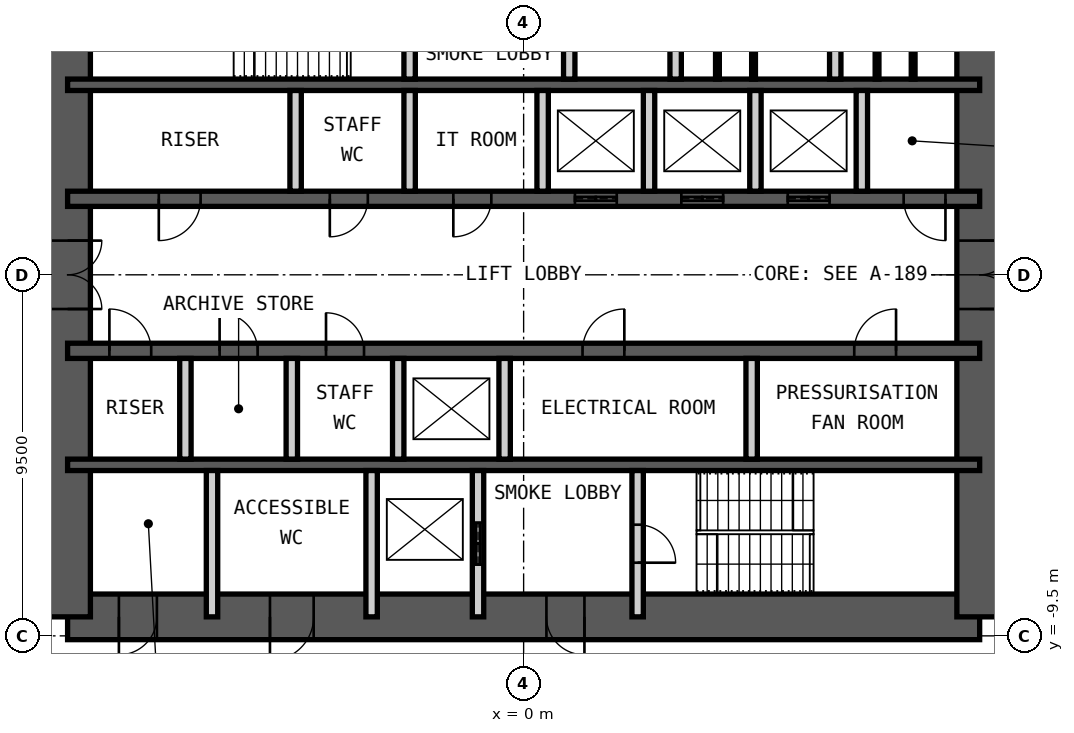
"""IFC4 building model, lengths in metres.
Left out: names, types, materials, properties, quantities, classifications, styles, units other than length and angle.
Written with IfcOpenShell. Run it as: python <this file> out.ifc"""

import sys

from ifc_helpers import new_model, si_unit, direction, frame, frame_2d, origin, place, context, subcontext, project, spatial, rectangle, extrude, element, fill, save


model = new_model("IFC4")
c1 = context("Model", 3, precision=1e-05, world=origin(), true_north=direction((0.0, 1.0)))
c2 = subcontext(c1, "Body", "Model", "MODEL_VIEW")
j1 = project(units=[si_unit("LENGTHUNIT", "METRE"), si_unit("PLANEANGLEUNIT", "RADIAN")], contexts=[c1])
p1 = place(None, origin())
s1 = spatial("IfcSite", under=j1, at=p1, CompositionType="ELEMENT")
p2 = place(p1, origin())
s2 = spatial("IfcBuilding", under=s1, at=p2, CompositionType="ELEMENT")
p3 = place(p2, frame((0.0, 0.0, 247.6)))
s3 = spatial("IfcBuildingStorey", under=s2, at=p3, CompositionType="ELEMENT", Elevation=247.6)
p4 = place(p3, frame((-12.0, -9.0, 0.0), z_axis=(0.0, 0.0, 1.0), x_axis=(1.0, 0.0, 0.0)))
e1 = element("IfcWall", 1, at=p4, inside=s3, PredefinedType="SHEAR", context=c2, shape_type="SweptSolid", body=[
    extrude(rectangle(XDim=24.0, YDim=1.2, at=frame_2d((12.0, 0.0))), origin(), (0.0, 0.0, 1.0), 4.2),
])
p5 = place(p4, frame((1.35, 0.0, 0.0)))
e2 = element("IfcOpeningElement", 2, at=p5, cuts=e1, PredefinedType="OPENING", context=c2, shape_type="SweptSolid", body=[
    extrude(rectangle(XDim=1.0, YDim=2.1, at=frame_2d((0.5, 1.05))), frame((0.0, 0.61, 0.0), z_axis=(0.0, -1.0, 0.0), x_axis=(1.0, 0.0, 0.0)), (0.0, 0.0, 1.0), 1.22),
])
p6 = place(p4, frame((5.325, 0.0, 0.0)))
e3 = element("IfcOpeningElement", 3, at=p6, cuts=e1, PredefinedType="OPENING", context=c2, shape_type="SweptSolid", body=[
    extrude(rectangle(XDim=1.15, YDim=2.1, at=frame_2d((0.575, 1.05))), frame((0.0, 0.61, 0.0), z_axis=(0.0, -1.0, 0.0), x_axis=(1.0, 0.0, 0.0)), (0.0, 0.0, 1.0), 1.22),
])
p7 = place(p4, frame((12.6, 0.0, 0.0)))
e4 = element("IfcOpeningElement", 4, at=p7, cuts=e1, PredefinedType="OPENING", context=c2, shape_type="SweptSolid", body=[
    extrude(rectangle(XDim=1.0, YDim=2.1, at=frame_2d((0.5, 1.05))), frame((0.0, 0.61, 0.0), z_axis=(0.0, -1.0, 0.0), x_axis=(1.0, 0.0, 0.0)), (0.0, 0.0, 1.0), 1.22),
])
p8 = place(p3, frame((12.0, -9.0, 0.0), z_axis=(0.0, 0.0, 1.0), x_axis=(0.0, 1.0, 0.0)))
e5 = element("IfcWall", 5, at=p8, inside=s3, PredefinedType="SHEAR", context=c2, shape_type="SweptSolid", body=[
    extrude(rectangle(XDim=18.0, YDim=1.2, at=frame_2d((9.0, 0.0))), origin(), (0.0, 0.0, 1.0), 4.2),
])
p9 = place(p8, frame((8.1, 0.0, 0.0)))
e6 = element("IfcOpeningElement", 6, at=p9, cuts=e5, PredefinedType="OPENING", context=c2, shape_type="SweptSolid", body=[
    extrude(rectangle(XDim=1.8, YDim=2.1, at=frame_2d((0.9, 1.05))), frame((0.0, 0.61, 0.0), z_axis=(0.0, -1.0, 0.0), x_axis=(1.0, 0.0, 0.0)), (0.0, 0.0, 1.0), 1.22),
])
p10 = place(p3, frame((-12.0, -9.0, 0.0), z_axis=(0.0, 0.0, 1.0), x_axis=(0.0, 1.0, 0.0)))
e7 = element("IfcWall", 7, at=p10, inside=s3, PredefinedType="SHEAR", context=c2, shape_type="SweptSolid", body=[
    extrude(rectangle(XDim=18.0, YDim=1.2, at=frame_2d((9.0, 0.0))), origin(), (0.0, 0.0, 1.0), 4.2),
])
p11 = place(p10, frame((8.1, 0.0, 0.0)))
e8 = element("IfcOpeningElement", 8, at=p11, cuts=e7, PredefinedType="OPENING", context=c2, shape_type="SweptSolid", body=[
    extrude(rectangle(XDim=1.8, YDim=2.1, at=frame_2d((0.9, 1.05))), frame((0.0, 0.61, 0.0), z_axis=(0.0, -1.0, 0.0), x_axis=(1.0, 0.0, 0.0)), (0.0, 0.0, 1.0), 1.22),
])
p12 = place(p3, frame((-12.0, 5.0, 0.0), z_axis=(0.0, 0.0, 1.0), x_axis=(1.0, 0.0, 0.0)))
e9 = element("IfcWall", 9, at=p12, inside=s3, PredefinedType="SHEAR", context=c2, shape_type="SweptSolid", body=[
    extrude(rectangle(XDim=24.0, YDim=0.3, at=frame_2d((12.0, 0.0))), origin(), (0.0, 0.0, 1.0), 4.2),
])
p13 = place(p3, frame((-12.0, 2.0, 0.0), z_axis=(0.0, 0.0, 1.0), x_axis=(1.0, 0.0, 0.0)))
e10 = element("IfcWall", 10, at=p13, inside=s3, PredefinedType="SHEAR", context=c2, shape_type="SweptSolid", body=[
    extrude(rectangle(XDim=24.0, YDim=0.4, at=frame_2d((12.0, 0.0))), origin(), (0.0, 0.0, 1.0), 4.2),
])
p14 = place(p13, frame((2.4, 0.0, 0.0)))
e11 = element("IfcOpeningElement", 11, at=p14, cuts=e10, PredefinedType="OPENING", context=c2, shape_type="SweptSolid", body=[
    extrude(rectangle(XDim=1.1, YDim=2.1, at=frame_2d((0.55, 1.05))), frame((0.0, 0.21, 0.0), z_axis=(0.0, -1.0, 0.0), x_axis=(1.0, 0.0, 0.0)), (0.0, 0.0, 1.0), 0.42),
])
p15 = place(p13, frame((22.0, 0.0, 0.0)))
e12 = element("IfcOpeningElement", 12, at=p15, cuts=e10, PredefinedType="OPENING", context=c2, shape_type="SweptSolid", body=[
    extrude(rectangle(XDim=1.1, YDim=2.1, at=frame_2d((0.55, 1.05))), frame((0.0, 0.21, 0.0), z_axis=(0.0, -1.0, 0.0), x_axis=(1.0, 0.0, 0.0)), (0.0, 0.0, 1.0), 0.42),
])
p16 = place(p13, frame((10.15, 0.0, 0.0)))
e13 = element("IfcOpeningElement", 13, at=p16, cuts=e10, PredefinedType="OPENING", context=c2, shape_type="SweptSolid", body=[
    extrude(rectangle(XDim=1.0, YDim=2.1, at=frame_2d((0.5, 1.05))), frame((0.0, 0.21, 0.0), z_axis=(0.0, -1.0, 0.0), x_axis=(1.0, 0.0, 0.0)), (0.0, 0.0, 1.0), 0.42),
])
p17 = place(p13, frame((6.9, 0.0, 0.0)))
e14 = element("IfcOpeningElement", 14, at=p17, cuts=e10, PredefinedType="OPENING", context=c2, shape_type="SweptSolid", body=[
    extrude(rectangle(XDim=1.0, YDim=2.1, at=frame_2d((0.5, 1.05))), frame((0.0, 0.21, 0.0), z_axis=(0.0, -1.0, 0.0), x_axis=(1.0, 0.0, 0.0)), (0.0, 0.0, 1.0), 0.42),
])
p18 = place(p13, frame((13.35, 0.0, 0.0)))
e15 = element("IfcOpeningElement", 15, at=p18, cuts=e10, PredefinedType="OPENING", context=c2, shape_type="SweptSolid", body=[
    extrude(rectangle(XDim=1.1, YDim=2.4, at=frame_2d((0.55, 1.2))), frame((0.0, 0.21, 0.0), z_axis=(0.0, -1.0, 0.0), x_axis=(1.0, 0.0, 0.0)), (0.0, 0.0, 1.0), 0.42),
])
p19 = place(p13, frame((16.15, 0.0, 0.0)))
e16 = element("IfcOpeningElement", 16, at=p19, cuts=e10, PredefinedType="OPENING", context=c2, shape_type="SweptSolid", body=[
    extrude(rectangle(XDim=1.1, YDim=2.4, at=frame_2d((0.55, 1.2))), frame((0.0, 0.21, 0.0), z_axis=(0.0, -1.0, 0.0), x_axis=(1.0, 0.0, 0.0)), (0.0, 0.0, 1.0), 0.42),
])
p20 = place(p13, frame((18.95, 0.0, 0.0)))
e17 = element("IfcOpeningElement", 17, at=p20, cuts=e10, PredefinedType="OPENING", context=c2, shape_type="SweptSolid", body=[
    extrude(rectangle(XDim=1.1, YDim=2.4, at=frame_2d((0.55, 1.2))), frame((0.0, 0.21, 0.0), z_axis=(0.0, -1.0, 0.0), x_axis=(1.0, 0.0, 0.0)), (0.0, 0.0, 1.0), 0.42),
])
p21 = place(p3, frame((-12.0, -2.0, 0.0), z_axis=(0.0, 0.0, 1.0), x_axis=(1.0, 0.0, 0.0)))
e18 = element("IfcWall", 18, at=p21, inside=s3, PredefinedType="SHEAR", context=c2, shape_type="SweptSolid", body=[
    extrude(rectangle(XDim=24.0, YDim=0.4, at=frame_2d((12.0, 0.0))), origin(), (0.0, 0.0, 1.0), 4.2),
])
p22 = place(p21, frame((1.1, 0.0, 0.0)))
e19 = element("IfcOpeningElement", 19, at=p22, cuts=e18, PredefinedType="OPENING", context=c2, shape_type="SweptSolid", body=[
    extrude(rectangle(XDim=1.1, YDim=2.1, at=frame_2d((0.55, 1.05))), frame((0.0, 0.21, 0.0), z_axis=(0.0, -1.0, 0.0), x_axis=(1.0, 0.0, 0.0)), (0.0, 0.0, 1.0), 0.42),
])
p23 = place(p21, frame((13.55, 0.0, 0.0)))
e20 = element("IfcOpeningElement", 20, at=p23, cuts=e18, PredefinedType="OPENING", context=c2, shape_type="SweptSolid", body=[
    extrude(rectangle(XDim=1.1, YDim=2.1, at=frame_2d((0.55, 1.05))), frame((0.0, 0.21, 0.0), z_axis=(0.0, -1.0, 0.0), x_axis=(1.0, 0.0, 0.0)), (0.0, 0.0, 1.0), 0.42),
])
p24 = place(p21, frame((20.7, 0.0, 0.0)))
e21 = element("IfcOpeningElement", 21, at=p24, cuts=e18, PredefinedType="OPENING", context=c2, shape_type="SweptSolid", body=[
    extrude(rectangle(XDim=1.1, YDim=2.1, at=frame_2d((0.55, 1.05))), frame((0.0, 0.21, 0.0), z_axis=(0.0, -1.0, 0.0), x_axis=(1.0, 0.0, 0.0)), (0.0, 0.0, 1.0), 0.42),
])
p25 = place(p21, frame((4.0, 0.0, 0.0)))
e22 = element("IfcOpeningElement", 22, at=p25, cuts=e18, PredefinedType="OPENING", context=c2, shape_type="SweptSolid", body=[
    extrude(rectangle(XDim=1.0, YDim=2.1, at=frame_2d((0.5, 1.05))), frame((0.0, 0.21, 0.0), z_axis=(0.0, -1.0, 0.0), x_axis=(1.0, 0.0, 0.0)), (0.0, 0.0, 1.0), 0.42),
])
p26 = place(p21, frame((6.8, 0.0, 0.0)))
e23 = element("IfcOpeningElement", 23, at=p26, cuts=e18, PredefinedType="OPENING", context=c2, shape_type="SweptSolid", body=[
    extrude(rectangle(XDim=1.0, YDim=2.1, at=frame_2d((0.5, 1.05))), frame((0.0, 0.21, 0.0), z_axis=(0.0, -1.0, 0.0), x_axis=(1.0, 0.0, 0.0)), (0.0, 0.0, 1.0), 0.42),
])
p27 = place(p3, frame((-12.0, -5.0, 0.0), z_axis=(0.0, 0.0, 1.0), x_axis=(1.0, 0.0, 0.0)))
e24 = element("IfcWall", 24, at=p27, inside=s3, PredefinedType="SHEAR", context=c2, shape_type="SweptSolid", body=[
    extrude(rectangle(XDim=24.0, YDim=0.3, at=frame_2d((12.0, 0.0))), origin(), (0.0, 0.0, 1.0), 4.2),
])
p28 = place(p3, frame((-3.0, 5.15, 0.0), z_axis=(0.0, 0.0, 1.0), x_axis=(0.0, 1.0, 0.0)))
e25 = element("IfcWall", 25, at=p28, inside=s3, PredefinedType="PARTITIONING", context=c2, shape_type="SweptSolid", body=[
    extrude(rectangle(XDim=3.85, YDim=0.3, at=frame_2d((1.925, 0.0))), origin(), (0.0, 0.0, 1.0), 3.98),
])
p29 = place(p28, frame((1.425, 0.0, 0.0)))
e26 = element("IfcOpeningElement", 26, at=p29, cuts=e25, PredefinedType="OPENING", context=c2, shape_type="SweptSolid", body=[
    extrude(rectangle(XDim=1.0, YDim=2.1, at=frame_2d((0.5, 1.05))), frame((0.0, 0.16, 0.0), z_axis=(0.0, -1.0, 0.0), x_axis=(1.0, 0.0, 0.0)), (0.0, 0.0, 1.0), 0.32),
])
p30 = place(p3, frame((1.2, 5.15, 0.0), z_axis=(0.0, 0.0, 1.0), x_axis=(0.0, 1.0, 0.0)))
e27 = element("IfcWall", 27, at=p30, inside=s3, PredefinedType="PARTITIONING", context=c2, shape_type="SweptSolid", body=[
    extrude(rectangle(XDim=3.85, YDim=0.3, at=frame_2d((1.925, 0.0))), origin(), (0.0, 0.0, 1.0), 3.98),
])
p31 = place(p30, frame((1.375, 0.0, 0.0)))
e28 = element("IfcOpeningElement", 28, at=p31, cuts=e27, PredefinedType="OPENING", context=c2, shape_type="SweptSolid", body=[
    extrude(rectangle(XDim=1.1, YDim=2.4, at=frame_2d((0.55, 1.2))), frame((0.0, 0.16, 0.0), z_axis=(0.0, -1.0, 0.0), x_axis=(1.0, 0.0, 0.0)), (0.0, 0.0, 1.0), 0.32),
])
for number, where, z_axis, x_axis in (
    (29, (4.0, 5.15, 0.0), (0.0, 0.0, 1.0), (0.0, 1.0, 0.0)),
    (30, (8.2, 5.15, 0.0), (0.0, 0.0, 1.0), (0.0, 1.0, 0.0)),
):
    element("IfcWall", number, at=place(p3, frame(where, z_axis=z_axis, x_axis=x_axis)), inside=s3, PredefinedType="PARTITIONING", context=c2, shape_type="SweptSolid", body=[
        extrude(rectangle(XDim=3.85, YDim=0.3, at=frame_2d((1.925, 0.0))), origin(), (0.0, 0.0, 1.0), 3.98),
    ])
for number, where, z_axis, x_axis in (
    (31, (-6.0, 2.2, 0.0), (0.0, 0.0, 1.0), (0.0, 1.0, 0.0)),
    (32, (-3.0, 2.2, 0.0), (0.0, 0.0, 1.0), (0.0, 1.0, 0.0)),
    (33, (0.5, 2.2, 0.0), (0.0, 0.0, 1.0), (0.0, 1.0, 0.0)),
    (34, (3.3, 2.2, 0.0), (0.0, 0.0, 1.0), (0.0, 1.0, 0.0)),
    (35, (6.1, 2.2, 0.0), (0.0, 0.0, 1.0), (0.0, 1.0, 0.0)),
    (36, (8.9, 2.2, 0.0), (0.0, 0.0, 1.0), (0.0, 1.0, 0.0)),
    (37, (-8.9, -4.85, 0.0), (0.0, 0.0, 1.0), (0.0, 1.0, 0.0)),
    (38, (-6.1, -4.85, 0.0), (0.0, 0.0, 1.0), (0.0, 1.0, 0.0)),
    (39, (-3.3, -4.85, 0.0), (0.0, 0.0, 1.0), (0.0, 1.0, 0.0)),
    (40, (-0.5, -4.85, 0.0), (0.0, 0.0, 1.0), (0.0, 1.0, 0.0)),
    (41, (6.0, -4.85, 0.0), (0.0, 0.0, 1.0), (0.0, 1.0, 0.0)),
):
    element("IfcWall", number, at=place(p3, frame(where, z_axis=z_axis, x_axis=x_axis)), inside=s3, PredefinedType="PARTITIONING", context=c2, shape_type="SweptSolid", body=[
        extrude(rectangle(XDim=2.65, YDim=0.3, at=frame_2d((1.325, 0.0))), origin(), (0.0, 0.0, 1.0), 3.98),
    ])
for number, where, z_axis, x_axis in (
    (42, (-8.2, -9.0, 0.0), (0.0, 0.0, 1.0), (0.0, 1.0, 0.0)),
    (43, (-4.0, -9.0, 0.0), (0.0, 0.0, 1.0), (0.0, 1.0, 0.0)),
):
    element("IfcWall", number, at=place(p3, frame(where, z_axis=z_axis, x_axis=x_axis)), inside=s3, PredefinedType="PARTITIONING", context=c2, shape_type="SweptSolid", body=[
        extrude(rectangle(XDim=3.85, YDim=0.3, at=frame_2d((1.925, 0.0))), origin(), (0.0, 0.0, 1.0), 3.98),
    ])
p32 = place(p3, frame((-1.2, -9.0, 0.0), z_axis=(0.0, 0.0, 1.0), x_axis=(0.0, 1.0, 0.0)))
e44 = element("IfcWall", 44, at=p32, inside=s3, PredefinedType="PARTITIONING", context=c2, shape_type="SweptSolid", body=[
    extrude(rectangle(XDim=3.85, YDim=0.3, at=frame_2d((1.925, 0.0))), origin(), (0.0, 0.0, 1.0), 3.98),
])
p33 = place(p32, frame((1.375, 0.0, 0.0)))
e45 = element("IfcOpeningElement", 45, at=p33, cuts=e44, PredefinedType="OPENING", context=c2, shape_type="SweptSolid", body=[
    extrude(rectangle(XDim=1.1, YDim=2.4, at=frame_2d((0.55, 1.2))), frame((0.0, 0.16, 0.0), z_axis=(0.0, -1.0, 0.0), x_axis=(1.0, 0.0, 0.0)), (0.0, 0.0, 1.0), 0.32),
])
p34 = place(p3, frame((3.0, -9.0, 0.0), z_axis=(0.0, 0.0, 1.0), x_axis=(0.0, 1.0, 0.0)))
e46 = element("IfcWall", 46, at=p34, inside=s3, PredefinedType="PARTITIONING", context=c2, shape_type="SweptSolid", body=[
    extrude(rectangle(XDim=3.85, YDim=0.3, at=frame_2d((1.925, 0.0))), origin(), (0.0, 0.0, 1.0), 3.98),
])
p35 = place(p34, frame((1.425, 0.0, 0.0)))
e47 = element("IfcOpeningElement", 47, at=p35, cuts=e46, PredefinedType="OPENING", context=c2, shape_type="SweptSolid", body=[
    extrude(rectangle(XDim=1.0, YDim=2.1, at=frame_2d((0.5, 1.05))), frame((0.0, 0.16, 0.0), z_axis=(0.0, -1.0, 0.0), x_axis=(1.0, 0.0, 0.0)), (0.0, 0.0, 1.0), 0.32),
])
for number, where, z_axis, x_axis in (
    (48, (5.1, 5.15, 0.0), (0.0, 0.0, 1.0), (0.0, 1.0, 0.0)),
    (49, (6.05, 5.15, 0.0), (0.0, 0.0, 1.0), (0.0, 1.0, 0.0)),
    (50, (9.3, 5.15, 0.0), (0.0, 0.0, 1.0), (0.0, 1.0, 0.0)),
    (51, (10.25, 5.15, 0.0), (0.0, 0.0, 1.0), (0.0, 1.0, 0.0)),
):
    element("IfcWall", number, at=place(p3, frame(where, z_axis=z_axis, x_axis=x_axis)), inside=s3, PredefinedType="PARTITIONING", context=c2, shape_type="SweptSolid", body=[
        extrude(rectangle(XDim=1.5, YDim=0.1, at=frame_2d((0.75, 0.0))), origin(), (0.0, 0.0, 1.0), 2.1),
    ])
p36 = place(p5, origin())
e52 = element("IfcDoor", 52, at=p36, inside=s3, OperationType="SINGLE_SWING_LEFT", PredefinedType="DOOR", context=c2, shape_type="SweptSolid", body=[
    extrude(rectangle(XDim=1.0, YDim=2.1, at=frame_2d((0.5, 1.05))), frame((0.0, 0.025, 0.0), z_axis=(0.0, -1.0, 0.0), x_axis=(1.0, 0.0, 0.0)), (0.0, 0.0, 1.0), 0.05),
])
fill(e2, e52)
p37 = place(p6, origin())
e53 = element("IfcDoor", 53, at=p37, inside=s3, OperationType="SINGLE_SWING_LEFT", PredefinedType="DOOR", context=c2, shape_type="SweptSolid", body=[
    extrude(rectangle(XDim=1.15, YDim=2.1, at=frame_2d((0.575, 1.05))), frame((0.0, 0.025, 0.0), z_axis=(0.0, -1.0, 0.0), x_axis=(1.0, 0.0, 0.0)), (0.0, 0.0, 1.0), 0.05),
])
fill(e3, e53)
p38 = place(p7, origin())
e54 = element("IfcDoor", 54, at=p38, inside=s3, OperationType="SINGLE_SWING_RIGHT", PredefinedType="DOOR", context=c2, shape_type="SweptSolid", body=[
    extrude(rectangle(XDim=1.0, YDim=2.1, at=frame_2d((0.5, 1.05))), frame((0.0, 0.025, 0.0), z_axis=(0.0, -1.0, 0.0), x_axis=(1.0, 0.0, 0.0)), (0.0, 0.0, 1.0), 0.05),
])
fill(e4, e54)
p39 = place(p35, origin())
e55 = element("IfcDoor", 55, at=p39, inside=s3, OperationType="SINGLE_SWING_LEFT", PredefinedType="DOOR", context=c2, shape_type="SweptSolid", body=[
    extrude(rectangle(XDim=1.0, YDim=2.1, at=frame_2d((0.5, 1.05))), frame((0.0, 0.025, 0.0), z_axis=(0.0, -1.0, 0.0), x_axis=(1.0, 0.0, 0.0)), (0.0, 0.0, 1.0), 0.05),
])
fill(e47, e55)
p40 = place(p14, origin())
e56 = element("IfcDoor", 56, at=p40, inside=s3, OperationType="SINGLE_SWING_LEFT", PredefinedType="DOOR", context=c2, shape_type="SweptSolid", body=[
    extrude(rectangle(XDim=1.1, YDim=2.1, at=frame_2d((0.55, 1.05))), frame((0.0, 0.025, 0.0), z_axis=(0.0, -1.0, 0.0), x_axis=(1.0, 0.0, 0.0)), (0.0, 0.0, 1.0), 0.05),
])
fill(e11, e56)
p41 = place(p22, origin())
e57 = element("IfcDoor", 57, at=p41, inside=s3, OperationType="SINGLE_SWING_RIGHT", PredefinedType="DOOR", context=c2, shape_type="SweptSolid", body=[
    extrude(rectangle(XDim=1.1, YDim=2.1, at=frame_2d((0.55, 1.05))), frame((0.0, 0.025, 0.0), z_axis=(0.0, -1.0, 0.0), x_axis=(1.0, 0.0, 0.0)), (0.0, 0.0, 1.0), 0.05),
])
fill(e19, e57)
p42 = place(p15, origin())
e58 = element("IfcDoor", 58, at=p42, inside=s3, OperationType="SINGLE_SWING_RIGHT", PredefinedType="DOOR", context=c2, shape_type="SweptSolid", body=[
    extrude(rectangle(XDim=1.1, YDim=2.1, at=frame_2d((0.55, 1.05))), frame((0.0, 0.025, 0.0), z_axis=(0.0, -1.0, 0.0), x_axis=(1.0, 0.0, 0.0)), (0.0, 0.0, 1.0), 0.05),
])
fill(e12, e58)
p43 = place(p16, origin())
e59 = element("IfcDoor", 59, at=p43, inside=s3, OperationType="SINGLE_SWING_LEFT", PredefinedType="DOOR", context=c2, shape_type="SweptSolid", body=[
    extrude(rectangle(XDim=1.0, YDim=2.1, at=frame_2d((0.5, 1.05))), frame((0.0, 0.025, 0.0), z_axis=(0.0, -1.0, 0.0), x_axis=(1.0, 0.0, 0.0)), (0.0, 0.0, 1.0), 0.05),
])
fill(e13, e59)
p44 = place(p23, origin())
e60 = element("IfcDoor", 60, at=p44, inside=s3, OperationType="SINGLE_SWING_LEFT", PredefinedType="DOOR", context=c2, shape_type="SweptSolid", body=[
    extrude(rectangle(XDim=1.1, YDim=2.1, at=frame_2d((0.55, 1.05))), frame((0.0, 0.025, 0.0), z_axis=(0.0, -1.0, 0.0), x_axis=(1.0, 0.0, 0.0)), (0.0, 0.0, 1.0), 0.05),
])
fill(e20, e60)
p45 = place(p24, origin())
e61 = element("IfcDoor", 61, at=p45, inside=s3, OperationType="SINGLE_SWING_LEFT", PredefinedType="DOOR", context=c2, shape_type="SweptSolid", body=[
    extrude(rectangle(XDim=1.1, YDim=2.1, at=frame_2d((0.55, 1.05))), frame((0.0, 0.025, 0.0), z_axis=(0.0, -1.0, 0.0), x_axis=(1.0, 0.0, 0.0)), (0.0, 0.0, 1.0), 0.05),
])
fill(e21, e61)
p46 = place(p9, origin())
e62 = element("IfcDoor", 62, at=p46, inside=s3, OperationType="DOUBLE_DOOR_DOUBLE_SWING", PredefinedType="DOOR", context=c2, shape_type="SweptSolid", body=[
    extrude(rectangle(XDim=1.8, YDim=2.1, at=frame_2d((0.9, 1.05))), frame((0.0, 0.025, 0.0), z_axis=(0.0, -1.0, 0.0), x_axis=(1.0, 0.0, 0.0)), (0.0, 0.0, 1.0), 0.05),
])
fill(e6, e62)
p47 = place(p11, origin())
e63 = element("IfcDoor", 63, at=p47, inside=s3, OperationType="DOUBLE_DOOR_DOUBLE_SWING", PredefinedType="DOOR", context=c2, shape_type="SweptSolid", body=[
    extrude(rectangle(XDim=1.8, YDim=2.1, at=frame_2d((0.9, 1.05))), frame((0.0, 0.025, 0.0), z_axis=(0.0, -1.0, 0.0), x_axis=(1.0, 0.0, 0.0)), (0.0, 0.0, 1.0), 0.05),
])
fill(e8, e63)
p48 = place(p33, origin())
e64 = element("IfcDoor", 64, at=p48, inside=s3, OperationType="DOUBLE_DOOR_SLIDING", PredefinedType="DOOR", context=c2, shape_type="SweptSolid", body=[
    extrude(rectangle(XDim=1.1, YDim=2.4, at=frame_2d((0.55, 1.2))), frame((0.0, 0.025, 0.0), z_axis=(0.0, -1.0, 0.0), x_axis=(1.0, 0.0, 0.0)), (0.0, 0.0, 1.0), 0.05),
])
fill(e45, e64)
p49 = place(p17, origin())
e65 = element("IfcDoor", 65, at=p49, inside=s3, OperationType="SINGLE_SWING_LEFT", PredefinedType="DOOR", context=c2, shape_type="SweptSolid", body=[
    extrude(rectangle(XDim=1.0, YDim=2.1, at=frame_2d((0.5, 1.05))), frame((0.0, 0.025, 0.0), z_axis=(0.0, -1.0, 0.0), x_axis=(1.0, 0.0, 0.0)), (0.0, 0.0, 1.0), 0.05),
])
fill(e14, e65)
p50 = place(p18, origin())
e66 = element("IfcDoor", 66, at=p50, inside=s3, OperationType="DOUBLE_DOOR_SLIDING", PredefinedType="DOOR", context=c2, shape_type="SweptSolid", body=[
    extrude(rectangle(XDim=1.1, YDim=2.4, at=frame_2d((0.55, 1.2))), frame((0.0, 0.025, 0.0), z_axis=(0.0, -1.0, 0.0), x_axis=(1.0, 0.0, 0.0)), (0.0, 0.0, 1.0), 0.05),
])
fill(e15, e66)
p51 = place(p19, origin())
e67 = element("IfcDoor", 67, at=p51, inside=s3, OperationType="DOUBLE_DOOR_SLIDING", PredefinedType="DOOR", context=c2, shape_type="SweptSolid", body=[
    extrude(rectangle(XDim=1.1, YDim=2.4, at=frame_2d((0.55, 1.2))), frame((0.0, 0.025, 0.0), z_axis=(0.0, -1.0, 0.0), x_axis=(1.0, 0.0, 0.0)), (0.0, 0.0, 1.0), 0.05),
])
fill(e16, e67)
p52 = place(p20, origin())
e68 = element("IfcDoor", 68, at=p52, inside=s3, OperationType="DOUBLE_DOOR_SLIDING", PredefinedType="DOOR", context=c2, shape_type="SweptSolid", body=[
    extrude(rectangle(XDim=1.1, YDim=2.4, at=frame_2d((0.55, 1.2))), frame((0.0, 0.025, 0.0), z_axis=(0.0, -1.0, 0.0), x_axis=(1.0, 0.0, 0.0)), (0.0, 0.0, 1.0), 0.05),
])
fill(e17, e68)
p53 = place(p25, origin())
e69 = element("IfcDoor", 69, at=p53, inside=s3, OperationType="SINGLE_SWING_RIGHT", PredefinedType="DOOR", context=c2, shape_type="SweptSolid", body=[
    extrude(rectangle(XDim=1.0, YDim=2.1, at=frame_2d((0.5, 1.05))), frame((0.0, 0.025, 0.0), z_axis=(0.0, -1.0, 0.0), x_axis=(1.0, 0.0, 0.0)), (0.0, 0.0, 1.0), 0.05),
])
fill(e22, e69)
p54 = place(p26, origin())
e70 = element("IfcDoor", 70, at=p54, inside=s3, OperationType="SINGLE_SWING_RIGHT", PredefinedType="DOOR", context=c2, shape_type="SweptSolid", body=[
    extrude(rectangle(XDim=1.0, YDim=2.1, at=frame_2d((0.5, 1.05))), frame((0.0, 0.025, 0.0), z_axis=(0.0, -1.0, 0.0), x_axis=(1.0, 0.0, 0.0)), (0.0, 0.0, 1.0), 0.05),
])
fill(e23, e70)
save(model, sys.argv[1])
